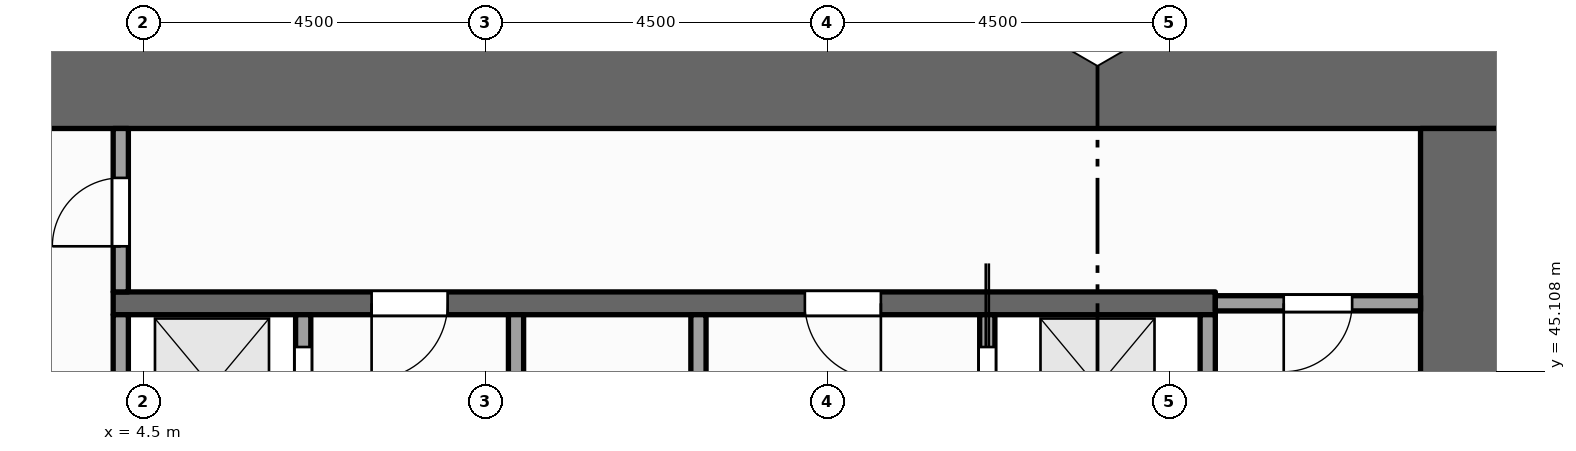
"""IFC4 building model, lengths in metres.
Left out: names, types, materials, properties, quantities, classifications, styles, units other than length and angle.
Written with IfcOpenShell. Run it as: python <this file> out.ifc"""

import sys

from ifc_helpers import new_model, si_unit, direction, frame, frame_2d, origin, place, context, subcontext, project, spatial, rectangle, extrude, element, fill, save


model = new_model("IFC4")
c1 = context("Model", 3, precision=1e-05, world=origin(), true_north=direction((0.0, 1.0)))
c2 = subcontext(c1, "Body", "Model", "MODEL_VIEW")
j1 = project(units=[si_unit("LENGTHUNIT", "METRE"), si_unit("PLANEANGLEUNIT", "RADIAN")], contexts=[c1])
p1 = place(None, origin())
s1 = spatial("IfcSite", under=j1, at=p1, CompositionType="ELEMENT")
p2 = place(p1, origin())
s2 = spatial("IfcBuilding", under=s1, at=p2, CompositionType="ELEMENT")
p3 = place(p2, frame((0.0, 0.0, 83.0)))
s3 = spatial("IfcBuildingStorey", under=s2, at=p3, CompositionType="ELEMENT", Elevation=83.0)
p4 = place(p3, frame((0.0, 48.9, -0.15), z_axis=(0.0, 0.0, 1.0), x_axis=(1.0, 0.0, 0.0)))
e1 = element("IfcWall", 1, at=p4, inside=s3, PredefinedType="SHEAR", context=c2, shape_type="SweptSolid", body=[
    extrude(rectangle(XDim=22.5, YDim=1.2, at=frame_2d((11.25, 0.0))), origin(), (0.0, 0.0, 1.0), 4.0),
])
p5 = place(p3, frame((21.9, 37.2, -0.15), z_axis=(0.0, 0.0, 1.0), x_axis=(0.0, 1.0, 0.0)))
e2 = element("IfcWall", 2, at=p5, inside=s3, PredefinedType="SHEAR", context=c2, shape_type="SweptSolid", body=[
    extrude(rectangle(XDim=11.1, YDim=1.2, at=frame_2d((5.55, 0.0))), origin(), (0.0, 0.0, 1.0), 4.0),
])
p6 = place(p3, frame((4.2, 43.525, 0.0), z_axis=(0.0, 0.0, 1.0), x_axis=(0.0, 1.0, 0.0)))
e3 = element("IfcWall", 3, at=p6, inside=s3, PredefinedType="SOLIDWALL", context=c2, shape_type="SweptSolid", body=[
    extrude(rectangle(XDim=2.325, YDim=0.2, at=frame_2d((1.163, 0.0))), origin(), (0.0, 0.0, 1.0), 3.85),
])
p7 = place(p3, frame((4.2, 46.15, 0.0), z_axis=(0.0, 0.0, 1.0), x_axis=(0.0, 1.0, 0.0)))
e4 = element("IfcWall", 4, at=p7, inside=s3, PredefinedType="PARTITIONING", context=c2, shape_type="SweptSolid", body=[
    extrude(rectangle(XDim=2.15, YDim=0.2, at=frame_2d((1.075, 0.0))), origin(), (0.0, 0.0, 1.0), 3.85),
])
p8 = place(p7, frame((0.6, 0.0, 0.0)))
e5 = element("IfcOpeningElement", 5, at=p8, cuts=e4, PredefinedType="OPENING", context=c2, shape_type="SweptSolid", body=[
    extrude(rectangle(XDim=0.9, YDim=2.1, at=frame_2d((0.45, 1.05))), frame((0.0, 0.11, 0.0), z_axis=(0.0, -1.0, 0.0), x_axis=(1.0, 0.0, 0.0)), (0.0, 0.0, 1.0), 0.22),
])
p9 = place(p3, frame((6.6, 37.2, 0.0), z_axis=(0.0, 0.0, 1.0), x_axis=(0.0, 1.0, 0.0)))
e6 = element("IfcWall", 6, at=p9, inside=s3, PredefinedType="SOLIDWALL", context=c2, shape_type="SweptSolid", body=[
    extrude(rectangle(XDim=8.65, YDim=0.2, at=frame_2d((4.325, 0.0))), origin(), (0.0, 0.0, 1.0), 3.85),
])
p10 = place(p9, frame((0.5, 0.0, 0.012)))
e7 = element("IfcOpeningElement", 7, at=p10, cuts=e6, PredefinedType="OPENING", context=c2, shape_type="SweptSolid", body=[
    extrude(rectangle(XDim=1.1, YDim=2.1, at=frame_2d((0.55, 1.05))), frame((0.0, 0.11, 0.0), z_axis=(0.0, -1.0, 0.0), x_axis=(1.0, 0.0, 0.0)), (0.0, 0.0, 1.0), 0.22),
])
p11 = place(p9, frame((2.75, 0.0, 0.012)))
e8 = element("IfcOpeningElement", 8, at=p11, cuts=e6, PredefinedType="OPENING", context=c2, shape_type="SweptSolid", body=[
    extrude(rectangle(XDim=1.1, YDim=2.1, at=frame_2d((0.55, 1.05))), frame((0.0, 0.11, 0.0), z_axis=(0.0, -1.0, 0.0), x_axis=(1.0, 0.0, 0.0)), (0.0, 0.0, 1.0), 0.22),
])
p12 = place(p9, frame((4.95, 0.0, 0.012)))
e9 = element("IfcOpeningElement", 9, at=p12, cuts=e6, PredefinedType="OPENING", context=c2, shape_type="SweptSolid", body=[
    extrude(rectangle(XDim=1.1, YDim=2.1, at=frame_2d((0.55, 1.05))), frame((0.0, 0.11, 0.0), z_axis=(0.0, -1.0, 0.0), x_axis=(1.0, 0.0, 0.0)), (0.0, 0.0, 1.0), 0.22),
])
p13 = place(p9, frame((7.125, 0.0, 0.012)))
e10 = element("IfcOpeningElement", 10, at=p13, cuts=e6, PredefinedType="OPENING", context=c2, shape_type="SweptSolid", body=[
    extrude(rectangle(XDim=1.1, YDim=2.1, at=frame_2d((0.55, 1.05))), frame((0.0, 0.11, 0.0), z_axis=(0.0, -1.0, 0.0), x_axis=(1.0, 0.0, 0.0)), (0.0, 0.0, 1.0), 0.22),
])
p14 = place(p3, frame((9.4, 37.2, 0.0), z_axis=(0.0, 0.0, 1.0), x_axis=(0.0, 1.0, 0.0)))
e11 = element("IfcWall", 11, at=p14, inside=s3, PredefinedType="PARTITIONING", context=c2, shape_type="SweptSolid", body=[
    extrude(rectangle(XDim=8.65, YDim=0.2, at=frame_2d((4.325, 0.0))), origin(), (0.0, 0.0, 1.0), 3.85),
])
p15 = place(p14, frame((1.7, 0.0, 0.0)))
e12 = element("IfcOpeningElement", 12, at=p15, cuts=e11, PredefinedType="OPENING", context=c2, shape_type="SweptSolid", body=[
    extrude(rectangle(XDim=0.9, YDim=2.1, at=frame_2d((0.45, 1.05))), frame((0.0, 0.11, 0.0), z_axis=(0.0, -1.0, 0.0), x_axis=(1.0, 0.0, 0.0)), (0.0, 0.0, 1.0), 0.22),
])
p16 = place(p14, frame((6.125, 0.0, 0.0)))
e13 = element("IfcOpeningElement", 13, at=p16, cuts=e11, PredefinedType="OPENING", context=c2, shape_type="SweptSolid", body=[
    extrude(rectangle(XDim=0.9, YDim=2.1, at=frame_2d((0.45, 1.05))), frame((0.0, 0.11, 0.0), z_axis=(0.0, -1.0, 0.0), x_axis=(1.0, 0.0, 0.0)), (0.0, 0.0, 1.0), 0.22),
])
p17 = place(p3, frame((11.8, 37.2, 0.0), z_axis=(0.0, 0.0, 1.0), x_axis=(0.0, 1.0, 0.0)))
e14 = element("IfcWall", 14, at=p17, inside=s3, PredefinedType="PARTITIONING", context=c2, shape_type="SweptSolid", body=[
    extrude(rectangle(XDim=8.65, YDim=0.2, at=frame_2d((4.325, 0.0))), origin(), (0.0, 0.0, 1.0), 3.85),
])
p18 = place(p3, frame((15.6, 43.7, 0.0), z_axis=(0.0, 0.0, 1.0), x_axis=(0.0, 1.0, 0.0)))
e15 = element("IfcWall", 15, at=p18, inside=s3, PredefinedType="SOLIDWALL", context=c2, shape_type="SweptSolid", body=[
    extrude(rectangle(XDim=2.15, YDim=0.2, at=frame_2d((1.075, 0.0))), origin(), (0.0, 0.0, 1.0), 3.85),
])
p19 = place(p18, frame((0.625, 0.0, 0.012)))
e16 = element("IfcOpeningElement", 16, at=p19, cuts=e15, PredefinedType="OPENING", context=c2, shape_type="SweptSolid", body=[
    extrude(rectangle(XDim=1.1, YDim=2.1, at=frame_2d((0.55, 1.05))), frame((0.0, 0.11, 0.0), z_axis=(0.0, -1.0, 0.0), x_axis=(1.0, 0.0, 0.0)), (0.0, 0.0, 1.0), 0.22),
])
p20 = place(p3, frame((18.5, 43.7, 0.0), z_axis=(0.0, 0.0, 1.0), x_axis=(0.0, 1.0, 0.0)))
e17 = element("IfcWall", 17, at=p20, inside=s3, PredefinedType="SOLIDWALL", context=c2, shape_type="SweptSolid", body=[
    extrude(rectangle(XDim=2.15, YDim=0.2, at=frame_2d((1.075, 0.0))), origin(), (0.0, 0.0, 1.0), 3.85),
])
p21 = place(p3, frame((4.1, 46.0, 0.0), z_axis=(0.0, 0.0, 1.0), x_axis=(1.0, 0.0, 0.0)))
e18 = element("IfcWall", 18, at=p21, inside=s3, PredefinedType="SHEAR", context=c2, shape_type="SweptSolid", body=[
    extrude(rectangle(XDim=14.5, YDim=0.3, at=frame_2d((7.25, 0.0))), origin(), (0.0, 0.0, 1.0), 3.85),
])
p22 = place(p21, frame((3.4, 0.0, 0.0)))
e19 = element("IfcOpeningElement", 19, at=p22, cuts=e18, PredefinedType="OPENING", context=c2, shape_type="SweptSolid", body=[
    extrude(rectangle(XDim=1.0, YDim=2.1, at=frame_2d((0.5, 1.05))), frame((0.0, 0.16, 0.0), z_axis=(0.0, -1.0, 0.0), x_axis=(1.0, 0.0, 0.0)), (0.0, 0.0, 1.0), 0.32),
])
p23 = place(p21, frame((9.1, 0.0, 0.0)))
e20 = element("IfcOpeningElement", 20, at=p23, cuts=e18, PredefinedType="OPENING", context=c2, shape_type="SweptSolid", body=[
    extrude(rectangle(XDim=1.0, YDim=2.1, at=frame_2d((0.5, 1.05))), frame((0.0, 0.16, 0.0), z_axis=(0.0, -1.0, 0.0), x_axis=(1.0, 0.0, 0.0)), (0.0, 0.0, 1.0), 0.32),
])
p24 = place(p3, frame((18.6, 46.0, 0.0), z_axis=(0.0, 0.0, 1.0), x_axis=(1.0, 0.0, 0.0)))
e21 = element("IfcWall", 21, at=p24, inside=s3, PredefinedType="PARTITIONING", context=c2, shape_type="SweptSolid", body=[
    extrude(rectangle(XDim=2.7, YDim=0.2, at=frame_2d((1.35, 0.0))), origin(), (0.0, 0.0, 1.0), 3.85),
])
p25 = place(p24, frame((0.9, 0.0, 0.0)))
e22 = element("IfcOpeningElement", 22, at=p25, cuts=e21, PredefinedType="OPENING", context=c2, shape_type="SweptSolid", body=[
    extrude(rectangle(XDim=0.9, YDim=2.1, at=frame_2d((0.45, 1.05))), frame((0.0, 0.11, 0.0), z_axis=(0.0, -1.0, 0.0), x_axis=(1.0, 0.0, 0.0)), (0.0, 0.0, 1.0), 0.22),
])
p26 = place(p13, origin())
e23 = element("IfcDoor", 23, at=p26, inside=s3, OperationType="SLIDING_TO_LEFT", PredefinedType="DOOR", context=c2, shape_type="SweptSolid", body=[
    extrude(rectangle(XDim=1.1, YDim=2.1, at=frame_2d((0.55, 1.05))), frame((0.0, 0.025, 0.0), z_axis=(0.0, -1.0, 0.0), x_axis=(1.0, 0.0, 0.0)), (0.0, 0.0, 1.0), 0.05),
])
fill(e10, e23)
p27 = place(p19, origin())
e24 = element("IfcDoor", 24, at=p27, inside=s3, OperationType="SLIDING_TO_RIGHT", PredefinedType="DOOR", context=c2, shape_type="SweptSolid", body=[
    extrude(rectangle(XDim=1.1, YDim=2.1, at=frame_2d((0.55, 1.05))), frame((0.0, 0.025, 0.0), z_axis=(0.0, -1.0, 0.0), x_axis=(1.0, 0.0, 0.0)), (0.0, 0.0, 1.0), 0.05),
])
fill(e16, e24)
p28 = place(p22, origin())
e25 = element("IfcDoor", 25, at=p28, inside=s3, OperationType="SINGLE_SWING_LEFT", PredefinedType="DOOR", context=c2, shape_type="SweptSolid", body=[
    extrude(rectangle(XDim=1.0, YDim=2.1, at=frame_2d((0.5, 1.05))), frame((0.0, 0.025, 0.0), z_axis=(0.0, -1.0, 0.0), x_axis=(1.0, 0.0, 0.0)), (0.0, 0.0, 1.0), 0.05),
])
fill(e19, e25)
p29 = place(p23, origin())
e26 = element("IfcDoor", 26, at=p29, inside=s3, OperationType="SINGLE_SWING_RIGHT", PredefinedType="DOOR", context=c2, shape_type="SweptSolid", body=[
    extrude(rectangle(XDim=1.0, YDim=2.1, at=frame_2d((0.5, 1.05))), frame((0.0, 0.025, 0.0), z_axis=(0.0, -1.0, 0.0), x_axis=(1.0, 0.0, 0.0)), (0.0, 0.0, 1.0), 0.05),
])
fill(e20, e26)
p30 = place(p8, origin())
e27 = element("IfcDoor", 27, at=p30, inside=s3, OperationType="SINGLE_SWING_LEFT", PredefinedType="DOOR", context=c2, shape_type="SweptSolid", body=[
    extrude(rectangle(XDim=0.9, YDim=2.1, at=frame_2d((0.45, 1.05))), frame((0.0, 0.025, 0.0), z_axis=(0.0, -1.0, 0.0), x_axis=(1.0, 0.0, 0.0)), (0.0, 0.0, 1.0), 0.05),
])
fill(e5, e27)
p31 = place(p25, origin())
e28 = element("IfcDoor", 28, at=p31, inside=s3, OperationType="SINGLE_SWING_LEFT", PredefinedType="DOOR", context=c2, shape_type="SweptSolid", body=[
    extrude(rectangle(XDim=0.9, YDim=2.1, at=frame_2d((0.45, 1.05))), frame((0.0, 0.025, 0.0), z_axis=(0.0, -1.0, 0.0), x_axis=(1.0, 0.0, 0.0)), (0.0, 0.0, 1.0), 0.05),
])
fill(e22, e28)
save(model, sys.argv[1])
